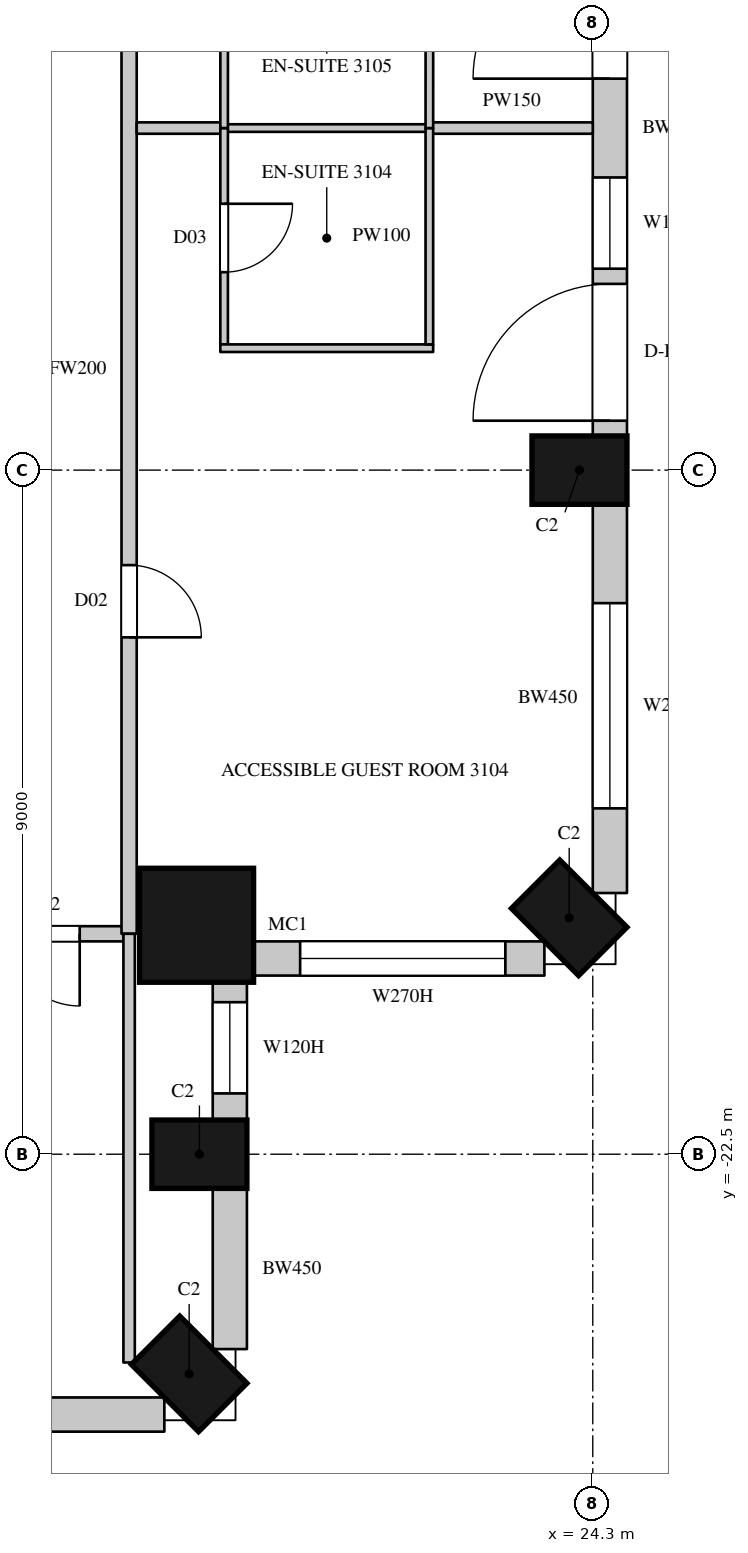
"""IFC4 building model, lengths in metres.
Left out: names, types, materials, properties, quantities, classifications, styles, units other than length and angle.
Written with IfcOpenShell. Run it as: python <this file> out.ifc"""

import sys

from ifc_helpers import new_model, si_unit, direction, frame, frame_2d, origin, origin_2d, place, context, subcontext, project, spatial, rectangle, circle, extrude, element, fill, save


model = new_model("IFC4")
c1 = context("Model", 3, precision=1e-05, world=origin(), true_north=direction((0.0, 1.0)))
c2 = subcontext(c1, "Body", "Model", "MODEL_VIEW")
j1 = project(units=[si_unit("LENGTHUNIT", "METRE"), si_unit("PLANEANGLEUNIT", "RADIAN")], contexts=[c1])
p1 = place(None, origin())
s1 = spatial("IfcSite", under=j1, at=p1, CompositionType="ELEMENT")
p2 = place(p1, origin())
s2 = spatial("IfcBuilding", under=s1, at=p2, CompositionType="ELEMENT")
p3 = place(p2, frame((0.0, 0.0, 141.9)))
s3 = spatial("IfcBuildingStorey", under=s2, at=p3, CompositionType="ELEMENT", Elevation=141.9)
for number, where, z_axis, x_axis in (
    (1, (18.99, -25.39, 0.0), (0.0, 0.0, 1.0), (0.707, 0.707, 0.0)),
    (2, (19.125, -22.5, 0.0), (0.0, 0.0, 1.0), (0.0, 1.0, 0.0)),
):
    element("IfcColumn", number, at=place(p3, frame(where, z_axis=z_axis, x_axis=x_axis)), inside=s3, PredefinedType="COLUMN", context=c2, shape_type="SweptSolid", body=[
        extrude(rectangle(XDim=0.9, YDim=1.25, at=origin_2d()), origin(), (0.0, 0.0, 1.0), 3.6),
    ])
p4 = place(p3, frame((19.088, -19.488, 0.0), z_axis=(0.0, 0.0, 1.0), x_axis=(1.0, 0.0, 0.0)))
e3 = element("IfcColumn", 3, at=p4, inside=s3, PredefinedType="COLUMN", context=c2, shape_type="SweptSolid", body=[
    extrude(circle(Radius=0.75, at=origin_2d()), origin(), (0.0, 0.0, 1.0), 3.6),
])
for number, where, z_axis, x_axis in (
    (4, (23.99, -19.39, 0.0), (0.0, 0.0, 1.0), (0.707, 0.707, 0.0)),
    (5, (24.125, -13.5, 0.0), (0.0, 0.0, 1.0), (0.0, 1.0, 0.0)),
):
    element("IfcColumn", number, at=place(p3, frame(where, z_axis=z_axis, x_axis=x_axis)), inside=s3, PredefinedType="COLUMN", context=c2, shape_type="SweptSolid", body=[
        extrude(rectangle(XDim=0.9, YDim=1.25, at=origin_2d()), origin(), (0.0, 0.0, 1.0), 3.6),
    ])
p5 = place(p3, frame((15.75, -25.925, 0.0), z_axis=(0.0, 0.0, 1.0), x_axis=(1.0, 0.0, 0.0)))
e6 = element("IfcWall", 6, at=p5, inside=s3, PredefinedType="SOLIDWALL", context=c2, shape_type="SweptSolid", body=[
    extrude(rectangle(XDim=2.914, YDim=0.45, at=frame_2d((1.457, 0.0))), origin(), (0.0, 0.0, 1.0), 3.3),
])
p6 = place(p3, frame((19.525, -25.064, 0.0), z_axis=(0.0, 0.0, 1.0), x_axis=(0.0, 1.0, 0.0)))
e7 = element("IfcWall", 7, at=p6, inside=s3, PredefinedType="SOLIDWALL", context=c2, shape_type="SweptSolid", body=[
    extrude(rectangle(XDim=2.114, YDim=0.45, at=frame_2d((1.057, 0.0))), origin(), (0.0, 0.0, 1.0), 3.3),
])
p7 = place(p3, frame((19.525, -22.05, 0.0), z_axis=(0.0, 0.0, 1.0), x_axis=(0.0, 1.0, 0.0)))
e8 = element("IfcWall", 8, at=p7, inside=s3, PredefinedType="SOLIDWALL", context=c2, shape_type="SweptSolid", body=[
    extrude(rectangle(XDim=1.843, YDim=0.45, at=frame_2d((0.921, 0.0))), origin(), (0.0, 0.0, 1.0), 3.3),
])
p8 = place(p7, frame((0.35, 0.0, 1.05)))
e9 = element("IfcOpeningElement", 9, at=p8, cuts=e8, PredefinedType="OPENING", context=c2, shape_type="SweptSolid", body=[
    extrude(rectangle(XDim=1.2, YDim=2.0, at=frame_2d((0.6, 1.0))), frame((0.0, 0.235, 0.0), z_axis=(0.0, -1.0, 0.0), x_axis=(1.0, 0.0, 0.0)), (0.0, 0.0, 1.0), 0.47),
])
p9 = place(p3, frame((19.807, -19.925, 0.0), z_axis=(0.0, 0.0, 1.0), x_axis=(1.0, 0.0, 0.0)))
e10 = element("IfcWall", 10, at=p9, inside=s3, PredefinedType="SOLIDWALL", context=c2, shape_type="SweptSolid", body=[
    extrude(rectangle(XDim=3.857, YDim=0.45, at=frame_2d((1.928, 0.0))), origin(), (0.0, 0.0, 1.0), 3.3),
])
p10 = place(p9, frame((0.643, 0.0, 1.05)))
e11 = element("IfcOpeningElement", 11, at=p10, cuts=e10, PredefinedType="OPENING", context=c2, shape_type="SweptSolid", body=[
    extrude(rectangle(XDim=2.7, YDim=2.0, at=frame_2d((1.35, 1.0))), frame((0.0, 0.235, 0.0), z_axis=(0.0, -1.0, 0.0), x_axis=(1.0, 0.0, 0.0)), (0.0, 0.0, 1.0), 0.47),
])
p11 = place(p3, frame((24.525, -19.064, 0.0), z_axis=(0.0, 0.0, 1.0), x_axis=(0.0, 1.0, 0.0)))
e12 = element("IfcWall", 12, at=p11, inside=s3, PredefinedType="SOLIDWALL", context=c2, shape_type="SweptSolid", body=[
    extrude(rectangle(XDim=5.114, YDim=0.45, at=frame_2d((2.557, 0.0))), origin(), (0.0, 0.0, 1.0), 3.3),
])
p12 = place(p11, frame((1.114, 0.0, 1.05)))
e13 = element("IfcOpeningElement", 13, at=p12, cuts=e12, PredefinedType="OPENING", context=c2, shape_type="SweptSolid", body=[
    extrude(rectangle(XDim=2.7, YDim=2.0, at=frame_2d((1.35, 1.0))), frame((0.0, 0.235, 0.0), z_axis=(0.0, -1.0, 0.0), x_axis=(1.0, 0.0, 0.0)), (0.0, 0.0, 1.0), 0.47),
])
p13 = place(p3, frame((24.525, -13.05, 0.0), z_axis=(0.0, 0.0, 1.0), x_axis=(0.0, 1.0, 0.0)))
e14 = element("IfcWall", 14, at=p13, inside=s3, PredefinedType="SOLIDWALL", context=c2, shape_type="SweptSolid", body=[
    extrude(rectangle(XDim=8.1, YDim=0.45, at=frame_2d((4.05, 0.0))), origin(), (0.0, 0.0, 1.0), 3.3),
])
p14 = place(p13, frame((0.2, 0.0, 0.0)))
e15 = element("IfcOpeningElement", 15, at=p14, cuts=e14, PredefinedType="OPENING", context=c2, shape_type="SweptSolid", body=[
    extrude(rectangle(XDim=1.8, YDim=2.4, at=frame_2d((0.9, 1.2))), frame((0.0, 0.235, 0.0), z_axis=(0.0, -1.0, 0.0), x_axis=(1.0, 0.0, 0.0)), (0.0, 0.0, 1.0), 0.47),
])
p15 = place(p13, frame((2.2, 0.0, 1.05)))
e16 = element("IfcOpeningElement", 16, at=p15, cuts=e14, PredefinedType="OPENING", context=c2, shape_type="SweptSolid", body=[
    extrude(rectangle(XDim=1.2, YDim=2.0, at=frame_2d((0.6, 1.0))), frame((0.0, 0.235, 0.0), z_axis=(0.0, -1.0, 0.0), x_axis=(1.0, 0.0, 0.0)), (0.0, 0.0, 1.0), 0.47),
])
p16 = place(p13, frame((4.7, 0.0, 0.0)))
e17 = element("IfcOpeningElement", 17, at=p16, cuts=e14, PredefinedType="OPENING", context=c2, shape_type="SweptSolid", body=[
    extrude(rectangle(XDim=1.8, YDim=2.4, at=frame_2d((0.9, 1.2))), frame((0.0, 0.235, 0.0), z_axis=(0.0, -1.0, 0.0), x_axis=(1.0, 0.0, 0.0)), (0.0, 0.0, 1.0), 0.47),
])
p17 = place(p13, frame((6.7, 0.0, 1.05)))
e18 = element("IfcOpeningElement", 18, at=p17, cuts=e14, PredefinedType="OPENING", context=c2, shape_type="SweptSolid", body=[
    extrude(rectangle(XDim=1.2, YDim=2.0, at=frame_2d((0.6, 1.0))), frame((0.0, 0.235, 0.0), z_axis=(0.0, -1.0, 0.0), x_axis=(1.0, 0.0, 0.0)), (0.0, 0.0, 1.0), 0.47),
])
p18 = place(p3, frame((-20.7, -19.6, 0.0), z_axis=(0.0, 0.0, 1.0), x_axis=(1.0, 0.0, 0.0)))
e19 = element("IfcWall", 19, at=p18, inside=s3, PredefinedType="PARTITIONING", context=c2, shape_type="SweptSolid", body=[
    extrude(rectangle(XDim=38.825, YDim=0.2, at=frame_2d((19.413, 0.0))), origin(), (0.0, 0.0, 1.0), 3.3),
])
p19 = place(p18, frame((3.15, 0.0, 0.0)))
e20 = element("IfcOpeningElement", 20, at=p19, cuts=e19, PredefinedType="OPENING", context=c2, shape_type="SweptSolid", body=[
    extrude(rectangle(XDim=1.1, YDim=2.4, at=frame_2d((0.55, 1.2))), frame((0.0, 0.11, 0.0), z_axis=(0.0, -1.0, 0.0), x_axis=(1.0, 0.0, 0.0)), (0.0, 0.0, 1.0), 0.22),
])
p20 = place(p18, frame((14.85, 0.0, 0.0)))
e21 = element("IfcOpeningElement", 21, at=p20, cuts=e19, PredefinedType="OPENING", context=c2, shape_type="SweptSolid", body=[
    extrude(rectangle(XDim=1.1, YDim=2.4, at=frame_2d((0.55, 1.2))), frame((0.0, 0.11, 0.0), z_axis=(0.0, -1.0, 0.0), x_axis=(1.0, 0.0, 0.0)), (0.0, 0.0, 1.0), 0.22),
])
p21 = place(p18, frame((23.85, 0.0, 0.0)))
e22 = element("IfcOpeningElement", 22, at=p21, cuts=e19, PredefinedType="OPENING", context=c2, shape_type="SweptSolid", body=[
    extrude(rectangle(XDim=1.1, YDim=2.4, at=frame_2d((0.55, 1.2))), frame((0.0, 0.11, 0.0), z_axis=(0.0, -1.0, 0.0), x_axis=(1.0, 0.0, 0.0)), (0.0, 0.0, 1.0), 0.22),
])
p22 = place(p18, frame((37.3, 0.0, 0.0)))
e23 = element("IfcOpeningElement", 23, at=p22, cuts=e19, PredefinedType="OPENING", context=c2, shape_type="SweptSolid", body=[
    extrude(rectangle(XDim=0.95, YDim=2.2, at=frame_2d((0.475, 1.1))), frame((0.0, 0.11, 0.0), z_axis=(0.0, -1.0, 0.0), x_axis=(1.0, 0.0, 0.0)), (0.0, 0.0, 1.0), 0.22),
])
p23 = place(p3, frame((18.2, -19.6, 0.0), z_axis=(0.0, 0.0, 1.0), x_axis=(0.0, 1.0, 0.0)))
e24 = element("IfcWall", 24, at=p23, inside=s3, PredefinedType="PARTITIONING", context=c2, shape_type="SweptSolid", body=[
    extrude(rectangle(XDim=14.85, YDim=0.2, at=frame_2d((7.425, 0.0))), origin(), (0.0, 0.0, 1.0), 3.3),
])
p24 = place(p23, frame((3.9, 0.0, 0.0)))
e25 = element("IfcOpeningElement", 25, at=p24, cuts=e24, PredefinedType="OPENING", context=c2, shape_type="SweptSolid", body=[
    extrude(rectangle(XDim=0.95, YDim=2.2, at=frame_2d((0.475, 1.1))), frame((0.0, 0.11, 0.0), z_axis=(0.0, -1.0, 0.0), x_axis=(1.0, 0.0, 0.0)), (0.0, 0.0, 1.0), 0.22),
])
p25 = place(p23, frame((13.5, 0.0, 0.0)))
e26 = element("IfcOpeningElement", 26, at=p25, cuts=e24, PredefinedType="OPENING", context=c2, shape_type="SweptSolid", body=[
    extrude(rectangle(XDim=0.95, YDim=2.2, at=frame_2d((0.475, 1.1))), frame((0.0, 0.11, 0.0), z_axis=(0.0, -1.0, 0.0), x_axis=(1.0, 0.0, 0.0)), (0.0, 0.0, 1.0), 0.22),
])
p26 = place(p3, frame((18.2, -25.24, 0.0), z_axis=(0.0, 0.0, 1.0), x_axis=(0.0, 1.0, 0.0)))
e27 = element("IfcWall", 27, at=p26, inside=s3, PredefinedType="PARTITIONING", context=c2, shape_type="SweptSolid", body=[
    extrude(rectangle(XDim=5.64, YDim=0.15, at=frame_2d((2.82, 0.0))), origin(), (0.0, 0.0, 1.0), 3.3),
])
p27 = place(p3, frame((18.3, -9.0, 0.0), z_axis=(0.0, 0.0, 1.0), x_axis=(1.0, 0.0, 0.0)))
e28 = element("IfcWall", 28, at=p27, inside=s3, PredefinedType="PARTITIONING", context=c2, shape_type="SweptSolid", body=[
    extrude(rectangle(XDim=1.13, YDim=0.15, at=frame_2d((0.565, 0.0))), origin(), (0.0, 0.0, 1.0), 3.3),
])
p28 = place(p3, frame((22.17, -9.0, 0.0), z_axis=(0.0, 0.0, 1.0), x_axis=(1.0, 0.0, 0.0)))
e29 = element("IfcWall", 29, at=p28, inside=s3, PredefinedType="PARTITIONING", context=c2, shape_type="SweptSolid", body=[
    extrude(rectangle(XDim=2.13, YDim=0.15, at=frame_2d((1.065, 0.0))), origin(), (0.0, 0.0, 1.0), 3.3),
])
p29 = place(p3, frame((19.43, -9.0, 0.0), z_axis=(0.0, 0.0, 1.0), x_axis=(1.0, 0.0, 0.0)))
e30 = element("IfcWall", 30, at=p29, inside=s3, PredefinedType="PARTITIONING", context=c2, shape_type="SweptSolid", body=[
    extrude(rectangle(XDim=2.74, YDim=0.1, at=frame_2d((1.37, 0.0))), origin(), (0.0, 0.0, 1.0), 3.3),
])
p30 = place(p3, frame((19.45, -11.846, 0.0), z_axis=(0.0, 0.0, 1.0), x_axis=(0.0, 1.0, 0.0)))
e31 = element("IfcWall", 31, at=p30, inside=s3, PredefinedType="PARTITIONING", context=c2, shape_type="SweptSolid", body=[
    extrude(rectangle(XDim=2.846, YDim=0.1, at=frame_2d((1.423, 0.0))), origin(), (0.0, 0.0, 1.0), 3.3),
])
p31 = place(p30, frame((0.95, 0.0, 0.0)))
e32 = element("IfcOpeningElement", 32, at=p31, cuts=e31, PredefinedType="OPENING", context=c2, shape_type="SweptSolid", body=[
    extrude(rectangle(XDim=0.9, YDim=2.2, at=frame_2d((0.45, 1.1))), frame((0.0, 0.06, 0.0), z_axis=(0.0, -1.0, 0.0), x_axis=(1.0, 0.0, 0.0)), (0.0, 0.0, 1.0), 0.12),
])
p32 = place(p3, frame((19.4, -11.896, 0.0), z_axis=(0.0, 0.0, 1.0), x_axis=(1.0, 0.0, 0.0)))
e33 = element("IfcWall", 33, at=p32, inside=s3, PredefinedType="PARTITIONING", context=c2, shape_type="SweptSolid", body=[
    extrude(rectangle(XDim=2.8, YDim=0.1, at=frame_2d((1.4, 0.0))), origin(), (0.0, 0.0, 1.0), 3.3),
])
p33 = place(p3, frame((19.45, -9.0, 0.0), z_axis=(0.0, 0.0, 1.0), x_axis=(0.000399241409, 0.999999920303, 0.0)))
e34 = element("IfcWall", 34, at=p33, inside=s3, PredefinedType="PARTITIONING", context=c2, shape_type="SweptSolid", body=[
    extrude(rectangle(XDim=2.446, YDim=0.1, at=frame_2d((1.223, 0.0))), origin(), (0.0, 0.0, 1.0), 3.3),
])
p34 = place(p33, frame((1.3, 0.0, 0.0)))
e35 = element("IfcOpeningElement", 35, at=p34, cuts=e34, PredefinedType="OPENING", context=c2, shape_type="SweptSolid", body=[
    extrude(rectangle(XDim=0.9, YDim=2.2, at=frame_2d((0.45, 1.1))), frame((0.0, 0.06, 0.0), z_axis=(0.0, -1.0, 0.0), x_axis=(1.0, 0.0, 0.0)), (0.0, 0.0, 1.0), 0.12),
])
p35 = place(p3, frame((22.15, -11.846, 0.0), z_axis=(0.0, 0.0, 1.0), x_axis=(0.0, 1.0, 0.0)))
e36 = element("IfcWall", 36, at=p35, inside=s3, PredefinedType="PARTITIONING", context=c2, shape_type="SweptSolid", body=[
    extrude(rectangle(XDim=2.846, YDim=0.1, at=frame_2d((1.423, 0.0))), origin(), (0.0, 0.0, 1.0), 3.3),
])
p36 = place(p3, frame((22.15, -9.0, 0.0), z_axis=(0.0, 0.0, 1.0), x_axis=(0.00041644973, 0.999999913285, 0.0)))
e37 = element("IfcWall", 37, at=p36, inside=s3, PredefinedType="PARTITIONING", context=c2, shape_type="SweptSolid", body=[
    extrude(rectangle(XDim=2.345, YDim=0.1, at=frame_2d((1.172, 0.0))), origin(), (0.0, 0.0, 1.0), 3.3),
])
p37 = place(p8, origin())
e38 = element("IfcWindow", 38, at=p37, inside=s3, PartitioningType="SINGLE_PANEL", PredefinedType="WINDOW", context=c2, shape_type="SweptSolid", body=[
    extrude(rectangle(XDim=1.2, YDim=2.0, at=frame_2d((0.6, 1.0))), frame((0.0, 0.135, 0.0), z_axis=(0.0, -1.0, 0.0), x_axis=(1.0, 0.0, 0.0)), (0.0, 0.0, 1.0), 0.06),
])
fill(e9, e38)
p38 = place(p10, origin())
e39 = element("IfcWindow", 39, at=p38, inside=s3, PartitioningType="SINGLE_PANEL", PredefinedType="WINDOW", context=c2, shape_type="SweptSolid", body=[
    extrude(rectangle(XDim=2.7, YDim=2.0, at=frame_2d((1.35, 1.0))), frame((0.0, 0.135, 0.0), z_axis=(0.0, -1.0, 0.0), x_axis=(1.0, 0.0, 0.0)), (0.0, 0.0, 1.0), 0.06),
])
fill(e11, e39)
p39 = place(p12, origin())
e40 = element("IfcWindow", 40, at=p39, inside=s3, PartitioningType="SINGLE_PANEL", PredefinedType="WINDOW", context=c2, shape_type="SweptSolid", body=[
    extrude(rectangle(XDim=2.7, YDim=2.0, at=frame_2d((1.35, 1.0))), frame((0.0, 0.135, 0.0), z_axis=(0.0, -1.0, 0.0), x_axis=(1.0, 0.0, 0.0)), (0.0, 0.0, 1.0), 0.06),
])
fill(e13, e40)
p40 = place(p14, origin())
e41 = element("IfcDoor", 41, at=p40, inside=s3, OperationType="SLIDING_TO_LEFT", PredefinedType="DOOR", context=c2, shape_type="SweptSolid", body=[
    extrude(rectangle(XDim=1.8, YDim=2.4, at=frame_2d((0.9, 1.2))), frame((0.0, 0.13, 0.0), z_axis=(0.0, -1.0, 0.0), x_axis=(1.0, 0.0, 0.0)), (0.0, 0.0, 1.0), 0.05),
])
fill(e15, e41)
p41 = place(p15, origin())
e42 = element("IfcWindow", 42, at=p41, inside=s3, PartitioningType="SINGLE_PANEL", PredefinedType="WINDOW", context=c2, shape_type="SweptSolid", body=[
    extrude(rectangle(XDim=1.2, YDim=2.0, at=frame_2d((0.6, 1.0))), frame((0.0, 0.135, 0.0), z_axis=(0.0, -1.0, 0.0), x_axis=(1.0, 0.0, 0.0)), (0.0, 0.0, 1.0), 0.06),
])
fill(e16, e42)
p42 = place(p16, origin())
e43 = element("IfcDoor", 43, at=p42, inside=s3, OperationType="SLIDING_TO_LEFT", PredefinedType="DOOR", context=c2, shape_type="SweptSolid", body=[
    extrude(rectangle(XDim=1.8, YDim=2.4, at=frame_2d((0.9, 1.2))), frame((0.0, 0.13, 0.0), z_axis=(0.0, -1.0, 0.0), x_axis=(1.0, 0.0, 0.0)), (0.0, 0.0, 1.0), 0.05),
])
fill(e17, e43)
p43 = place(p24, origin())
e44 = element("IfcDoor", 44, at=p43, inside=s3, OperationType="SINGLE_SWING_RIGHT", PredefinedType="DOOR", context=c2, shape_type="SweptSolid", body=[
    extrude(rectangle(XDim=0.95, YDim=2.2, at=frame_2d((0.475, 1.1))), frame((0.0, 0.025, 0.0), z_axis=(0.0, -1.0, 0.0), x_axis=(1.0, 0.0, 0.0)), (0.0, 0.0, 1.0), 0.05),
])
fill(e25, e44)
p44 = place(p31, origin())
e45 = element("IfcDoor", 45, at=p44, inside=s3, OperationType="SINGLE_SWING_LEFT", PredefinedType="DOOR", context=c2, shape_type="SweptSolid", body=[
    extrude(rectangle(XDim=0.9, YDim=2.2, at=frame_2d((0.45, 1.1))), frame((0.0, 0.025, 0.0), z_axis=(0.0, -1.0, 0.0), x_axis=(1.0, 0.0, 0.0)), (0.0, 0.0, 1.0), 0.05),
])
fill(e32, e45)
p45 = place(p22, origin())
e46 = element("IfcDoor", 46, at=p45, inside=s3, OperationType="SINGLE_SWING_LEFT", PredefinedType="DOOR", context=c2, shape_type="SweptSolid", body=[
    extrude(rectangle(XDim=0.95, YDim=2.2, at=frame_2d((0.475, 1.1))), frame((0.0, 0.025, 0.0), z_axis=(0.0, -1.0, 0.0), x_axis=(1.0, 0.0, 0.0)), (0.0, 0.0, 1.0), 0.05),
])
fill(e23, e46)
save(model, sys.argv[1])
